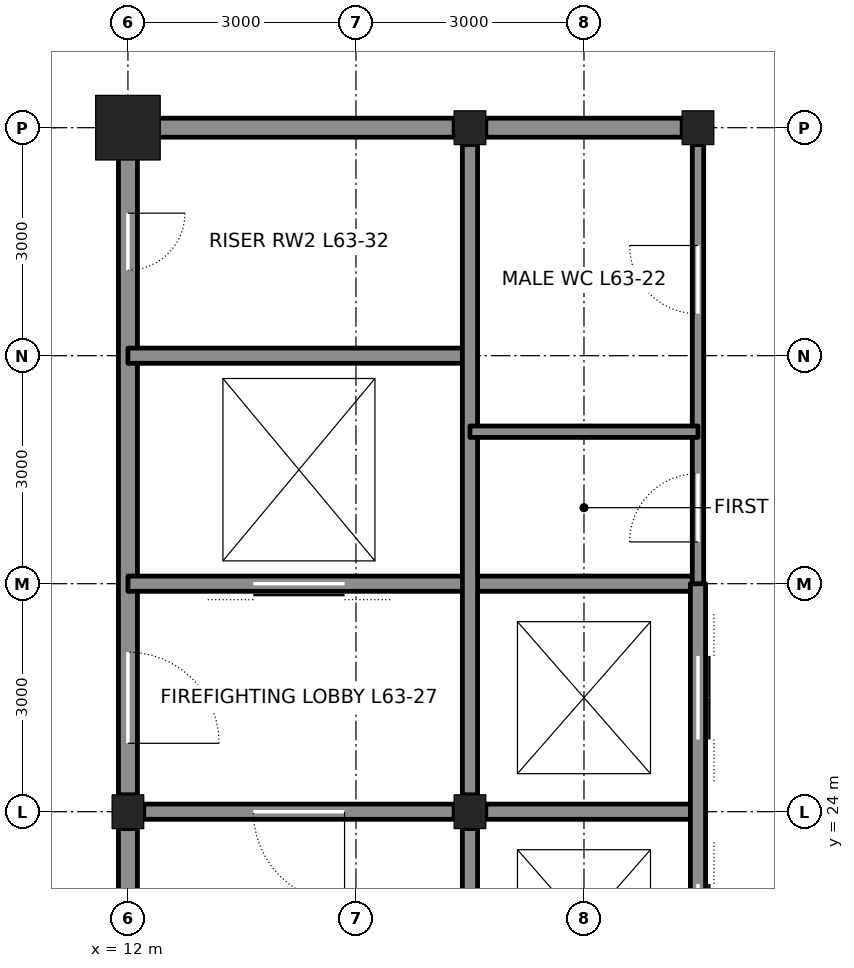
"""IFC4 building model, lengths in metres.
Left out: names, types, materials, properties, quantities, classifications, styles, units other than length and angle.
Written with IfcOpenShell. Run it as: python <this file> out.ifc"""

import sys

from ifc_helpers import new_model, si_unit, direction, frame, frame_2d, origin, origin_2d, place, context, subcontext, project, spatial, rectangle, hollow_rectangle, i_section, extrude, element, fill, save


model = new_model("IFC4")
c1 = context("Model", 3, precision=1e-05, world=origin(), true_north=direction((0.0, 1.0)))
c2 = subcontext(c1, "Body", "Model", "MODEL_VIEW")
j1 = project(units=[si_unit("LENGTHUNIT", "METRE"), si_unit("PLANEANGLEUNIT", "RADIAN")], contexts=[c1])
p1 = place(None, origin())
s1 = spatial("IfcSite", under=j1, at=p1, CompositionType="ELEMENT")
p2 = place(p1, origin())
s2 = spatial("IfcBuilding", under=s1, at=p2, CompositionType="ELEMENT")
p3 = place(p2, frame((0.0, 0.0, 283.2)))
s3 = spatial("IfcBuildingStorey", under=s2, at=p3, CompositionType="ELEMENT", Elevation=283.2)
p4 = place(p3, frame((12.0, 33.0, 0.0), z_axis=(0.0, 0.0, 1.0), x_axis=(1.0, 0.0, 0.0)))
e1 = element("IfcColumn", 1, at=p4, inside=s3, PredefinedType="COLUMN", context=c2, shape_type="SweptSolid", body=[
    extrude(hollow_rectangle(XDim=0.85, YDim=0.85, WallThickness=0.085, at=origin_2d()), origin(), (0.0, 0.0, 1.0), 4.2),
])
for number, where, z_axis, x_axis in (
    (2, (16.5, 33.0, 0.0), (0.0, 0.0, 1.0), (1.0, 0.0, 0.0)),
    (3, (19.5, 33.0, 0.0), (0.0, 0.0, 1.0), (1.0, 0.0, 0.0)),
    (4, (12.0, 24.0, 0.0), (0.0, 0.0, 1.0), (1.0, 0.0, 0.0)),
    (5, (16.5, 24.0, 0.0), (0.0, 0.0, 1.0), (1.0, 0.0, 0.0)),
):
    element("IfcColumn", number, at=place(p3, frame(where, z_axis=z_axis, x_axis=x_axis)), inside=s3, PredefinedType="COLUMN", context=c2, shape_type="SweptSolid", body=[
        extrude(i_section(OverallWidth=0.417, OverallDepth=0.445, WebThickness=0.039, FlangeThickness=0.063, at=origin_2d()), origin(), (0.0, 0.0, 1.0), 4.2),
    ])
p5 = place(p3, frame((12.0, 21.222, 0.0), z_axis=(0.0, 0.0, 1.0), x_axis=(0.0, 1.0, 0.0)))
e6 = element("IfcWall", 6, at=p5, inside=s3, PredefinedType="SOLIDWALL", context=c2, shape_type="SweptSolid", body=[
    extrude(rectangle(XDim=2.555, YDim=0.25, at=frame_2d((1.278, 0.0))), origin(), (0.0, 0.0, 1.0), 3.113),
])
p6 = place(p3, frame((12.0, 24.222, 0.0), z_axis=(0.0, 0.0, 1.0), x_axis=(0.0, 1.0, 0.0)))
e7 = element("IfcWall", 7, at=p6, inside=s3, PredefinedType="SOLIDWALL", context=c2, shape_type="SweptSolid", body=[
    extrude(rectangle(XDim=8.528, YDim=0.25, at=frame_2d((4.264, 0.0))), origin(), (0.0, 0.0, 1.0), 3.113),
])
p7 = place(p6, frame((0.678, 0.0, 0.0)))
e8 = element("IfcOpeningElement", 8, at=p7, cuts=e7, PredefinedType="OPENING", context=c2, shape_type="SweptSolid", body=[
    extrude(rectangle(XDim=1.2, YDim=2.1, at=frame_2d((0.6, 1.05))), frame((0.0, 0.135, 0.0), z_axis=(0.0, -1.0, 0.0), x_axis=(1.0, 0.0, 0.0)), (0.0, 0.0, 1.0), 0.27),
])
p8 = place(p6, frame((6.903, 0.0, 0.0)))
e9 = element("IfcOpeningElement", 9, at=p8, cuts=e7, PredefinedType="OPENING", context=c2, shape_type="SweptSolid", body=[
    extrude(rectangle(XDim=0.75, YDim=2.1, at=frame_2d((0.375, 1.05))), frame((0.0, 0.135, 0.0), z_axis=(0.0, -1.0, 0.0), x_axis=(1.0, 0.0, 0.0)), (0.0, 0.0, 1.0), 0.27),
])
p9 = place(p3, frame((12.208, 24.0, 0.0), z_axis=(0.0, 0.0, 1.0), x_axis=(1.0, 0.0, 0.0)))
e10 = element("IfcWall", 10, at=p9, inside=s3, PredefinedType="SOLIDWALL", context=c2, shape_type="SweptSolid", body=[
    extrude(rectangle(XDim=4.083, YDim=0.2, at=frame_2d((2.042, 0.0))), origin(), (0.0, 0.0, 1.0), 3.09),
])
p10 = place(p9, frame((1.442, 0.0, 0.0)))
e11 = element("IfcOpeningElement", 11, at=p10, cuts=e10, PredefinedType="OPENING", context=c2, shape_type="SweptSolid", body=[
    extrude(rectangle(XDim=1.2, YDim=2.1, at=frame_2d((0.6, 1.05))), frame((0.0, 0.11, 0.0), z_axis=(0.0, -1.0, 0.0), x_axis=(1.0, 0.0, 0.0)), (0.0, 0.0, 1.0), 0.22),
])
p11 = place(p3, frame((16.708, 24.0, 0.0), z_axis=(0.0, 0.0, 1.0), x_axis=(1.0, 0.0, 0.0)))
e12 = element("IfcWall", 12, at=p11, inside=s3, PredefinedType="SOLIDWALL", context=c2, shape_type="SweptSolid", body=[
    extrude(rectangle(XDim=2.792, YDim=0.2, at=frame_2d((1.396, 0.0))), origin(), (0.0, 0.0, 1.0), 3.09),
])
p12 = place(p3, frame((12.0, 27.0, 0.0), z_axis=(0.0, 0.0, 1.0), x_axis=(1.0, 0.0, 0.0)))
e13 = element("IfcWall", 13, at=p12, inside=s3, PredefinedType="SOLIDWALL", context=c2, shape_type="SweptSolid", body=[
    extrude(rectangle(XDim=7.5, YDim=0.2, at=frame_2d((3.75, 0.0))), origin(), (0.0, 0.0, 1.0), 4.04),
])
p13 = place(p12, frame((1.65, 0.0, 0.0)))
e14 = element("IfcOpeningElement", 14, at=p13, cuts=e13, PredefinedType="OPENING", context=c2, shape_type="SweptSolid", body=[
    extrude(rectangle(XDim=1.2, YDim=2.1, at=frame_2d((0.6, 1.05))), frame((0.0, 0.11, 0.0), z_axis=(0.0, -1.0, 0.0), x_axis=(1.0, 0.0, 0.0)), (0.0, 0.0, 1.0), 0.22),
])
p14 = place(p3, frame((12.0, 30.0, 0.0), z_axis=(0.0, 0.0, 1.0), x_axis=(1.0, 0.0, 0.0)))
e15 = element("IfcWall", 15, at=p14, inside=s3, PredefinedType="SOLIDWALL", context=c2, shape_type="SweptSolid", body=[
    extrude(rectangle(XDim=4.5, YDim=0.2, at=frame_2d((2.25, 0.0))), origin(), (0.0, 0.0, 1.0), 4.04),
])
p15 = place(p3, frame((12.25, 33.0, 0.0), z_axis=(0.0, 0.0, 1.0), x_axis=(1.0, 0.0, 0.0)))
e16 = element("IfcWall", 16, at=p15, inside=s3, PredefinedType="SOLIDWALL", context=c2, shape_type="SweptSolid", body=[
    extrude(rectangle(XDim=4.042, YDim=0.25, at=frame_2d((2.021, 0.0))), origin(), (0.0, 0.0, 1.0), 3.182),
])
p16 = place(p3, frame((16.708, 33.0, 0.0), z_axis=(0.0, 0.0, 1.0), x_axis=(1.0, 0.0, 0.0)))
e17 = element("IfcWall", 17, at=p16, inside=s3, PredefinedType="SOLIDWALL", context=c2, shape_type="SweptSolid", body=[
    extrude(rectangle(XDim=2.583, YDim=0.25, at=frame_2d((1.292, 0.0))), origin(), (0.0, 0.0, 1.0), 3.182),
])
p17 = place(p3, frame((16.5, 21.222, 0.0), z_axis=(0.0, 0.0, 1.0), x_axis=(0.0, 1.0, 0.0)))
e18 = element("IfcWall", 18, at=p17, inside=s3, PredefinedType="SOLIDWALL", context=c2, shape_type="SweptSolid", body=[
    extrude(rectangle(XDim=2.555, YDim=0.2, at=frame_2d((1.278, 0.0))), origin(), (0.0, 0.0, 1.0), 3.113),
])
p18 = place(p3, frame((16.5, 24.222, 0.0), z_axis=(0.0, 0.0, 1.0), x_axis=(0.0, 1.0, 0.0)))
e19 = element("IfcWall", 19, at=p18, inside=s3, PredefinedType="SOLIDWALL", context=c2, shape_type="SweptSolid", body=[
    extrude(rectangle(XDim=8.555, YDim=0.2, at=frame_2d((4.278, 0.0))), origin(), (0.0, 0.0, 1.0), 3.113),
])
p19 = place(p3, frame((19.5, 15.0, 0.0), z_axis=(0.0, 0.0, 1.0), x_axis=(0.0, 1.0, 0.0)))
e20 = element("IfcWall", 20, at=p19, inside=s3, PredefinedType="SOLIDWALL", context=c2, shape_type="SweptSolid", body=[
    extrude(rectangle(XDim=12.0, YDim=0.2, at=frame_2d((6.0, 0.0))), origin(), (0.0, 0.0, 1.0), 3.065),
])
p20 = place(p19, frame((0.95, 0.0, 0.0)))
e21 = element("IfcOpeningElement", 21, at=p20, cuts=e20, PredefinedType="OPENING", context=c2, shape_type="SweptSolid", body=[
    extrude(rectangle(XDim=1.1, YDim=2.1, at=frame_2d((0.55, 1.05))), frame((0.0, 0.11, 0.0), z_axis=(0.0, -1.0, 0.0), x_axis=(1.0, 0.0, 0.0)), (0.0, 0.0, 1.0), 0.22),
])
p21 = place(p19, frame((3.95, 0.0, 0.0)))
e22 = element("IfcOpeningElement", 22, at=p21, cuts=e20, PredefinedType="OPENING", context=c2, shape_type="SweptSolid", body=[
    extrude(rectangle(XDim=1.1, YDim=2.1, at=frame_2d((0.55, 1.05))), frame((0.0, 0.11, 0.0), z_axis=(0.0, -1.0, 0.0), x_axis=(1.0, 0.0, 0.0)), (0.0, 0.0, 1.0), 0.22),
])
p22 = place(p19, frame((6.95, 0.0, 0.0)))
e23 = element("IfcOpeningElement", 23, at=p22, cuts=e20, PredefinedType="OPENING", context=c2, shape_type="SweptSolid", body=[
    extrude(rectangle(XDim=1.1, YDim=2.1, at=frame_2d((0.55, 1.05))), frame((0.0, 0.11, 0.0), z_axis=(0.0, -1.0, 0.0), x_axis=(1.0, 0.0, 0.0)), (0.0, 0.0, 1.0), 0.22),
])
p23 = place(p19, frame((9.95, 0.0, 0.0)))
e24 = element("IfcOpeningElement", 24, at=p23, cuts=e20, PredefinedType="OPENING", context=c2, shape_type="SweptSolid", body=[
    extrude(rectangle(XDim=1.1, YDim=2.1, at=frame_2d((0.55, 1.05))), frame((0.0, 0.11, 0.0), z_axis=(0.0, -1.0, 0.0), x_axis=(1.0, 0.0, 0.0)), (0.0, 0.0, 1.0), 0.22),
])
p24 = place(p3, frame((19.5, 27.0, 0.0), z_axis=(0.0, 0.0, 1.0), x_axis=(0.0, 1.0, 0.0)))
e25 = element("IfcWall", 25, at=p24, inside=s3, PredefinedType="PARTITIONING", context=c2, shape_type="SweptSolid", body=[
    extrude(rectangle(XDim=5.778, YDim=0.15, at=frame_2d((2.889, 0.0))), origin(), (0.0, 0.0, 1.0), 3.065),
])
p25 = place(p24, frame((0.55, 0.0, 0.0)))
e26 = element("IfcOpeningElement", 26, at=p25, cuts=e25, PredefinedType="OPENING", context=c2, shape_type="SweptSolid", body=[
    extrude(rectangle(XDim=0.9, YDim=2.1, at=frame_2d((0.45, 1.05))), frame((0.0, 0.085, 0.0), z_axis=(0.0, -1.0, 0.0), x_axis=(1.0, 0.0, 0.0)), (0.0, 0.0, 1.0), 0.17),
])
p26 = place(p24, frame((3.55, 0.0, 0.0)))
e27 = element("IfcOpeningElement", 27, at=p26, cuts=e25, PredefinedType="OPENING", context=c2, shape_type="SweptSolid", body=[
    extrude(rectangle(XDim=0.9, YDim=2.1, at=frame_2d((0.45, 1.05))), frame((0.0, 0.085, 0.0), z_axis=(0.0, -1.0, 0.0), x_axis=(1.0, 0.0, 0.0)), (0.0, 0.0, 1.0), 0.17),
])
p27 = place(p3, frame((16.5, 29.0, 0.0), z_axis=(0.0, 0.0, 1.0), x_axis=(1.0, 0.0, 0.0)))
e28 = element("IfcWall", 28, at=p27, inside=s3, PredefinedType="PARTITIONING", context=c2, shape_type="SweptSolid", body=[
    extrude(rectangle(XDim=3.0, YDim=0.15, at=frame_2d((1.5, 0.0))), origin(), (0.0, 0.0, 1.0), 4.04),
])
p28 = place(p10, frame((1.2, 0.0, 0.0), z_axis=(0.0, 0.0, 1.0), x_axis=(-1.0, 0.0, 0.0)))
e29 = element("IfcDoor", 29, at=p28, inside=s3, OperationType="SINGLE_SWING_LEFT", PredefinedType="DOOR", context=c2, shape_type="SweptSolid", body=[
    extrude(rectangle(XDim=1.2, YDim=2.1, at=frame_2d((0.6, 1.05))), frame((0.0, 0.025, 0.0), z_axis=(0.0, -1.0, 0.0), x_axis=(1.0, 0.0, 0.0)), (0.0, 0.0, 1.0), 0.05),
])
fill(e11, e29)
p29 = place(p7, frame((1.2, 0.0, 0.0), z_axis=(0.0, 0.0, 1.0), x_axis=(-1.0, 0.0, 0.0)))
e30 = element("IfcDoor", 30, at=p29, inside=s3, OperationType="SINGLE_SWING_RIGHT", PredefinedType="DOOR", context=c2, shape_type="SweptSolid", body=[
    extrude(rectangle(XDim=1.2, YDim=2.1, at=frame_2d((0.6, 1.05))), frame((0.0, 0.025, 0.0), z_axis=(0.0, -1.0, 0.0), x_axis=(1.0, 0.0, 0.0)), (0.0, 0.0, 1.0), 0.05),
])
fill(e8, e30)
p30 = place(p13, origin())
e31 = element("IfcDoor", 31, at=p30, inside=s3, OperationType="DOUBLE_DOOR_SLIDING", PredefinedType="DOOR", context=c2, shape_type="SweptSolid", body=[
    extrude(rectangle(XDim=1.2, YDim=2.1, at=frame_2d((0.6, 1.05))), frame((0.0, 0.025, 0.0), z_axis=(0.0, -1.0, 0.0), x_axis=(1.0, 0.0, 0.0)), (0.0, 0.0, 1.0), 0.05),
])
fill(e14, e31)
p31 = place(p8, frame((0.75, 0.0, 0.0), z_axis=(0.0, 0.0, 1.0), x_axis=(-1.0, 0.0, 0.0)))
e32 = element("IfcDoor", 32, at=p31, inside=s3, OperationType="SINGLE_SWING_LEFT", PredefinedType="DOOR", context=c2, shape_type="SweptSolid", body=[
    extrude(rectangle(XDim=0.75, YDim=2.1, at=frame_2d((0.375, 1.05))), frame((0.0, 0.025, 0.0), z_axis=(0.0, -1.0, 0.0), x_axis=(1.0, 0.0, 0.0)), (0.0, 0.0, 1.0), 0.05),
])
fill(e9, e32)
p32 = place(p25, origin())
e33 = element("IfcDoor", 33, at=p32, inside=s3, OperationType="SINGLE_SWING_LEFT", PredefinedType="DOOR", context=c2, shape_type="SweptSolid", body=[
    extrude(rectangle(XDim=0.9, YDim=2.1, at=frame_2d((0.45, 1.05))), frame((0.0, 0.025, 0.0), z_axis=(0.0, -1.0, 0.0), x_axis=(1.0, 0.0, 0.0)), (0.0, 0.0, 1.0), 0.05),
])
fill(e26, e33)
p33 = place(p26, origin())
e34 = element("IfcDoor", 34, at=p33, inside=s3, OperationType="SINGLE_SWING_RIGHT", PredefinedType="DOOR", context=c2, shape_type="SweptSolid", body=[
    extrude(rectangle(XDim=0.9, YDim=2.1, at=frame_2d((0.45, 1.05))), frame((0.0, 0.025, 0.0), z_axis=(0.0, -1.0, 0.0), x_axis=(1.0, 0.0, 0.0)), (0.0, 0.0, 1.0), 0.05),
])
fill(e27, e34)
p34 = place(p22, origin())
e35 = element("IfcDoor", 35, at=p34, inside=s3, OperationType="DOUBLE_DOOR_SLIDING", PredefinedType="DOOR", context=c2, shape_type="SweptSolid", body=[
    extrude(rectangle(XDim=1.1, YDim=2.1, at=frame_2d((0.55, 1.05))), frame((0.0, 0.025, 0.0), z_axis=(0.0, -1.0, 0.0), x_axis=(1.0, 0.0, 0.0)), (0.0, 0.0, 1.0), 0.05),
])
fill(e23, e35)
p35 = place(p23, origin())
e36 = element("IfcDoor", 36, at=p35, inside=s3, OperationType="DOUBLE_DOOR_SLIDING", PredefinedType="DOOR", context=c2, shape_type="SweptSolid", body=[
    extrude(rectangle(XDim=1.1, YDim=2.1, at=frame_2d((0.55, 1.05))), frame((0.0, 0.025, 0.0), z_axis=(0.0, -1.0, 0.0), x_axis=(1.0, 0.0, 0.0)), (0.0, 0.0, 1.0), 0.05),
])
fill(e24, e36)
save(model, sys.argv[1])
